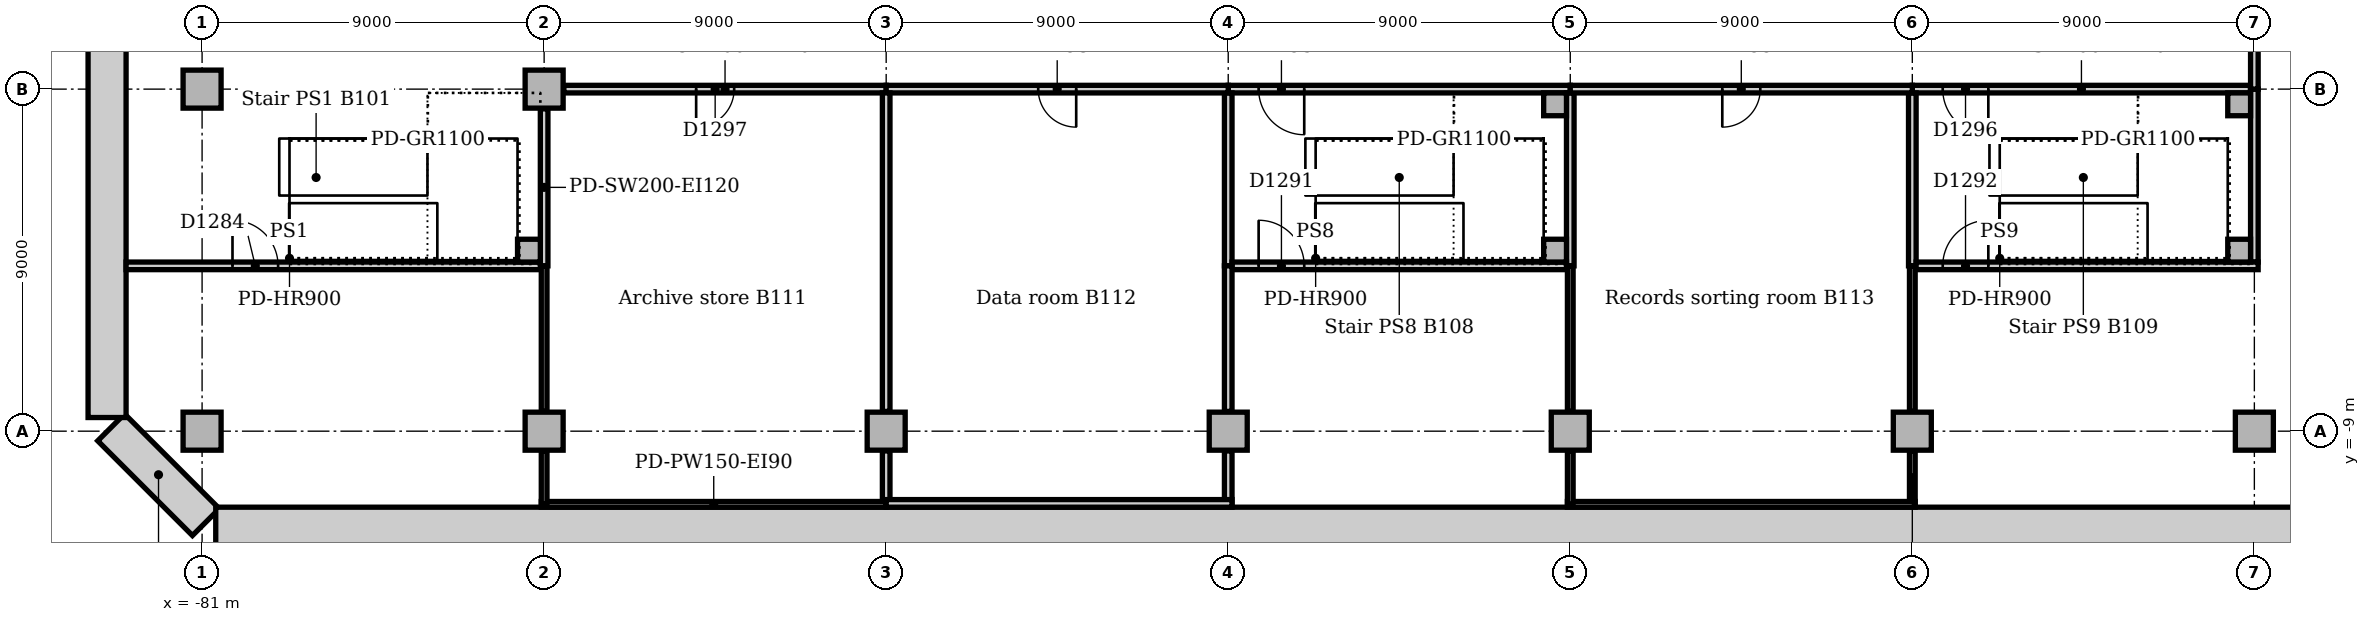
"""IFC4 building model, lengths in metres.
Left out: names, types, materials, properties, quantities, classifications, styles, units other than length and angle.
Written with IfcOpenShell. Run it as: python <this file> out.ifc"""

import sys

from ifc_helpers import new_model, si_unit, direction, frame, frame_2d, origin, origin_2d, place, context, subcontext, project, spatial, rectangle, extrude, element, fill, save


model = new_model("IFC4")
c1 = context("Model", 3, precision=1e-05, world=origin(), true_north=direction((0.0, 1.0)))
c2 = subcontext(c1, "Body", "Model", "MODEL_VIEW")
j1 = project(units=[si_unit("LENGTHUNIT", "METRE"), si_unit("PLANEANGLEUNIT", "RADIAN")], contexts=[c1])
p1 = place(None, origin())
s1 = spatial("IfcSite", under=j1, at=p1, CompositionType="ELEMENT")
p2 = place(p1, origin())
s2 = spatial("IfcBuilding", under=s1, at=p2, CompositionType="ELEMENT")
p3 = place(p2, frame((0.0, 0.0, -5.0)))
s3 = spatial("IfcBuildingStorey", under=s2, at=p3, CompositionType="ELEMENT", Elevation=-5.0)
p4 = place(p3, frame((-80.9, -11.392, 0.0), z_axis=(0.0, 0.0, 1.0), x_axis=(-0.707106781187, 0.707106781187, 0.0)))
e1 = element("IfcWall", 1, at=p4, inside=s3, PredefinedType="SOLIDWALL", context=c2, shape_type="SweptSolid", body=[
    extrude(rectangle(XDim=3.524, YDim=1.0, at=frame_2d((1.762, 0.0))), origin(), (0.0, 0.0, 1.0), 4.7),
])
p5 = place(p3, frame((-83.5, -8.641, 0.0), z_axis=(0.0, 0.0, 1.0), x_axis=(0.0, 1.0, 0.0)))
e2 = element("IfcWall", 2, at=p5, inside=s3, PredefinedType="SOLIDWALL", context=c2, shape_type="SweptSolid", body=[
    extrude(rectangle(XDim=62.282, YDim=1.0, at=frame_2d((31.141, 0.0))), origin(), (0.0, 0.0, 1.0), 4.7),
])
p6 = place(p3, frame((62.641, -11.5, 0.0), z_axis=(0.0, 0.0, 1.0), x_axis=(-1.0, 0.0, 0.0)))
e3 = element("IfcWall", 3, at=p6, inside=s3, PredefinedType="SOLIDWALL", context=c2, shape_type="SweptSolid", body=[
    extrude(rectangle(XDim=143.282, YDim=1.0, at=frame_2d((71.641, 0.0))), origin(), (0.0, 0.0, 1.0), 4.7),
])
for number, where, z_axis, x_axis in (
    (4, (-81.0, -9.0, 0.0), (0.0, 0.0, 1.0), (1.0, 0.0, 0.0)),
    (5, (-81.0, 0.0, 0.0), (0.0, 0.0, 1.0), (1.0, 0.0, 0.0)),
    (6, (-72.0, -9.0, 0.0), (0.0, 0.0, 1.0), (1.0, 0.0, 0.0)),
    (7, (-72.0, 0.0, 0.0), (0.0, 0.0, 1.0), (1.0, 0.0, 0.0)),
    (8, (-63.0, -9.0, 0.0), (0.0, 0.0, 1.0), (1.0, 0.0, 0.0)),
    (9, (-54.0, -9.0, 0.0), (0.0, 0.0, 1.0), (1.0, 0.0, 0.0)),
    (10, (-45.0, -9.0, 0.0), (0.0, 0.0, 1.0), (1.0, 0.0, 0.0)),
    (11, (-36.0, -9.0, 0.0), (0.0, 0.0, 1.0), (1.0, 0.0, 0.0)),
    (12, (-27.0, -9.0, 0.0), (0.0, 0.0, 1.0), (1.0, 0.0, 0.0)),
):
    element("IfcColumn", number, at=place(p3, frame(where, z_axis=z_axis, x_axis=x_axis)), inside=s3, PredefinedType="COLUMN", context=c2, shape_type="SweptSolid", body=[
        extrude(rectangle(XDim=1.0, YDim=1.0, at=origin_2d()), origin(), (0.0, 0.0, 1.0), 4.7),
    ])
for number, where, z_axis, x_axis in (
    (13, (-72.4, -4.25, 0.0), (0.0, 0.0, 1.0), (1.0, 0.0, 0.0)),
    (14, (-45.4, -4.25, 0.0), (0.0, 0.0, 1.0), (1.0, 0.0, 0.0)),
    (15, (-45.4, -0.4, 0.0), (0.0, 0.0, 1.0), (1.0, 0.0, 0.0)),
    (16, (-27.4, -4.25, 0.0), (0.0, 0.0, 1.0), (1.0, 0.0, 0.0)),
    (17, (-27.4, -0.4, 0.0), (0.0, 0.0, 1.0), (1.0, 0.0, 0.0)),
):
    element("IfcColumn", number, at=place(p3, frame(where, z_axis=z_axis, x_axis=x_axis)), inside=s3, PredefinedType="COLUMN", context=c2, shape_type="SweptSolid", body=[
        extrude(rectangle(XDim=0.6, YDim=0.6, at=origin_2d()), origin(), (0.0, 0.0, 1.0), 5.0),
    ])
p7 = place(p3, frame((-72.0, -4.65, 0.0), z_axis=(0.0, 0.0, 1.0), x_axis=(0.0, 1.0, 0.0)))
e18 = element("IfcWall", 18, at=p7, inside=s3, PredefinedType="SOLIDWALL", context=c2, shape_type="SweptSolid", body=[
    extrude(rectangle(XDim=4.13, YDim=0.2, at=frame_2d((2.065, 0.0))), origin(), (0.0, 0.0, 1.0), 4.7),
])
p8 = place(p3, frame((-83.0, -4.65, 0.0), z_axis=(0.0, 0.0, 1.0), x_axis=(1.0, 0.0, 0.0)))
e19 = element("IfcWall", 19, at=p8, inside=s3, PredefinedType="SOLIDWALL", context=c2, shape_type="SweptSolid", body=[
    extrude(rectangle(XDim=10.9, YDim=0.2, at=frame_2d((5.45, 0.0))), origin(), (0.0, 0.0, 1.0), 4.7),
])
p9 = place(p8, frame((2.8, 0.0, 0.0)))
e20 = element("IfcOpeningElement", 20, at=p9, cuts=e19, PredefinedType="OPENING", context=c2, shape_type="SweptSolid", body=[
    extrude(rectangle(XDim=1.2, YDim=2.1, at=frame_2d((0.6, 1.05))), frame((0.0, 0.11, 0.0), z_axis=(0.0, -1.0, 0.0), x_axis=(1.0, 0.0, 0.0)), (0.0, 0.0, 1.0), 0.22),
])
p10 = place(p3, frame((-54.0, 0.0, 0.0), z_axis=(0.0, 0.0, 1.0), x_axis=(1.0, 0.0, 0.0)))
e21 = element("IfcWall", 21, at=p10, inside=s3, PredefinedType="SOLIDWALL", context=c2, shape_type="SweptSolid", body=[
    extrude(rectangle(XDim=9.0, YDim=0.2, at=frame_2d((4.5, 0.0))), origin(), (0.0, 0.0, 1.0), 4.7),
])
p11 = place(p10, frame((0.8, 0.0, 0.0)))
e22 = element("IfcOpeningElement", 22, at=p11, cuts=e21, PredefinedType="OPENING", context=c2, shape_type="SweptSolid", body=[
    extrude(rectangle(XDim=1.2, YDim=2.1, at=frame_2d((0.6, 1.05))), frame((0.0, 0.11, 0.0), z_axis=(0.0, -1.0, 0.0), x_axis=(1.0, 0.0, 0.0)), (0.0, 0.0, 1.0), 0.22),
])
for number, where, z_axis, x_axis in (
    (23, (-54.0, -4.65, 0.0), (0.0, 0.0, 1.0), (0.0, 1.0, 0.0)),
    (24, (-45.0, -4.65, 0.0), (0.0, 0.0, 1.0), (0.0, 1.0, 0.0)),
):
    element("IfcWall", number, at=place(p3, frame(where, z_axis=z_axis, x_axis=x_axis)), inside=s3, PredefinedType="SOLIDWALL", context=c2, shape_type="SweptSolid", body=[
        extrude(rectangle(XDim=4.55, YDim=0.2, at=frame_2d((2.275, 0.0))), origin(), (0.0, 0.0, 1.0), 4.7),
    ])
p12 = place(p3, frame((-53.9, -4.65, 0.0), z_axis=(0.0, 0.0, 1.0), x_axis=(1.0, 0.0, 0.0)))
e25 = element("IfcWall", 25, at=p12, inside=s3, PredefinedType="SOLIDWALL", context=c2, shape_type="SweptSolid", body=[
    extrude(rectangle(XDim=8.8, YDim=0.2, at=frame_2d((4.4, 0.0))), origin(), (0.0, 0.0, 1.0), 4.7),
])
p13 = place(p12, frame((0.7, 0.0, 0.0)))
e26 = element("IfcOpeningElement", 26, at=p13, cuts=e25, PredefinedType="OPENING", context=c2, shape_type="SweptSolid", body=[
    extrude(rectangle(XDim=1.2, YDim=2.1, at=frame_2d((0.6, 1.05))), frame((0.0, 0.11, 0.0), z_axis=(0.0, -1.0, 0.0), x_axis=(1.0, 0.0, 0.0)), (0.0, 0.0, 1.0), 0.22),
])
p14 = place(p3, frame((-36.0, 0.0, 0.0), z_axis=(0.0, 0.0, 1.0), x_axis=(1.0, 0.0, 0.0)))
e27 = element("IfcWall", 27, at=p14, inside=s3, PredefinedType="SOLIDWALL", context=c2, shape_type="SweptSolid", body=[
    extrude(rectangle(XDim=8.9, YDim=0.2, at=frame_2d((4.45, 0.0))), origin(), (0.0, 0.0, 1.0), 4.7),
])
p15 = place(p14, frame((0.8, 0.0, 0.0)))
e28 = element("IfcOpeningElement", 28, at=p15, cuts=e27, PredefinedType="OPENING", context=c2, shape_type="SweptSolid", body=[
    extrude(rectangle(XDim=1.2, YDim=2.1, at=frame_2d((0.6, 1.05))), frame((0.0, 0.11, 0.0), z_axis=(0.0, -1.0, 0.0), x_axis=(1.0, 0.0, 0.0)), (0.0, 0.0, 1.0), 0.22),
])
for number, where, z_axis, x_axis in (
    (29, (-36.0, -4.65, 0.0), (0.0, 0.0, 1.0), (0.0, 1.0, 0.0)),
    (30, (-27.0, -4.55, 0.0), (0.0, 0.0, 1.0), (0.0, 1.0, 0.0)),
):
    element("IfcWall", number, at=place(p3, frame(where, z_axis=z_axis, x_axis=x_axis)), inside=s3, PredefinedType="SOLIDWALL", context=c2, shape_type="SweptSolid", body=[
        extrude(rectangle(XDim=4.55, YDim=0.2, at=frame_2d((2.275, 0.0))), origin(), (0.0, 0.0, 1.0), 4.7),
    ])
p16 = place(p3, frame((-35.9, -4.65, 0.0), z_axis=(0.0, 0.0, 1.0), x_axis=(1.0, 0.0, 0.0)))
e31 = element("IfcWall", 31, at=p16, inside=s3, PredefinedType="SOLIDWALL", context=c2, shape_type="SweptSolid", body=[
    extrude(rectangle(XDim=9.0, YDim=0.2, at=frame_2d((4.5, 0.0))), origin(), (0.0, 0.0, 1.0), 4.7),
])
p17 = place(p16, frame((0.7, 0.0, 0.0)))
e32 = element("IfcOpeningElement", 32, at=p17, cuts=e31, PredefinedType="OPENING", context=c2, shape_type="SweptSolid", body=[
    extrude(rectangle(XDim=1.2, YDim=2.1, at=frame_2d((0.6, 1.05))), frame((0.0, 0.11, 0.0), z_axis=(0.0, -1.0, 0.0), x_axis=(1.0, 0.0, 0.0)), (0.0, 0.0, 1.0), 0.22),
])
p18 = place(p3, frame((-71.48, 0.0, 0.0), z_axis=(0.0, 0.0, 1.0), x_axis=(1.0, 0.0, 0.0)))
e33 = element("IfcWall", 33, at=p18, inside=s3, PredefinedType="PARTITIONING", context=c2, shape_type="SweptSolid", body=[
    extrude(rectangle(XDim=8.48, YDim=0.2, at=frame_2d((4.24, 0.0))), origin(), (0.0, 0.0, 1.0), 4.7),
])
p19 = place(p18, frame((3.48, 0.0, 0.0)))
e34 = element("IfcOpeningElement", 34, at=p19, cuts=e33, PredefinedType="OPENING", context=c2, shape_type="SweptSolid", body=[
    extrude(rectangle(XDim=1.0, YDim=2.1, at=frame_2d((0.5, 1.05))), frame((0.0, 0.11, 0.0), z_axis=(0.0, -1.0, 0.0), x_axis=(1.0, 0.0, 0.0)), (0.0, 0.0, 1.0), 0.22),
])
p20 = place(p3, frame((-63.0, 0.0, 0.0), z_axis=(0.0, 0.0, 1.0), x_axis=(1.0, 0.0, 0.0)))
e35 = element("IfcWall", 35, at=p20, inside=s3, PredefinedType="PARTITIONING", context=c2, shape_type="SweptSolid", body=[
    extrude(rectangle(XDim=9.0, YDim=0.2, at=frame_2d((4.5, 0.0))), origin(), (0.0, 0.0, 1.0), 4.7),
])
p21 = place(p20, frame((4.0, 0.0, 0.0)))
e36 = element("IfcOpeningElement", 36, at=p21, cuts=e35, PredefinedType="OPENING", context=c2, shape_type="SweptSolid", body=[
    extrude(rectangle(XDim=1.0, YDim=2.1, at=frame_2d((0.5, 1.05))), frame((0.0, 0.11, 0.0), z_axis=(0.0, -1.0, 0.0), x_axis=(1.0, 0.0, 0.0)), (0.0, 0.0, 1.0), 0.22),
])
p22 = place(p3, frame((-45.0, 0.0, 0.0), z_axis=(0.0, 0.0, 1.0), x_axis=(1.0, 0.0, 0.0)))
e37 = element("IfcWall", 37, at=p22, inside=s3, PredefinedType="PARTITIONING", context=c2, shape_type="SweptSolid", body=[
    extrude(rectangle(XDim=9.0, YDim=0.2, at=frame_2d((4.5, 0.0))), origin(), (0.0, 0.0, 1.0), 4.7),
])
p23 = place(p22, frame((4.0, 0.0, 0.0)))
e38 = element("IfcOpeningElement", 38, at=p23, cuts=e37, PredefinedType="OPENING", context=c2, shape_type="SweptSolid", body=[
    extrude(rectangle(XDim=1.0, YDim=2.1, at=frame_2d((0.5, 1.05))), frame((0.0, 0.11, 0.0), z_axis=(0.0, -1.0, 0.0), x_axis=(1.0, 0.0, 0.0)), (0.0, 0.0, 1.0), 0.22),
])
p24 = place(p3, frame((-27.0, 0.0, 0.0), z_axis=(0.0, 0.0, 1.0), x_axis=(0.0, 1.0, 0.0)))
e39 = element("IfcWall", 39, at=p24, inside=s3, PredefinedType="PARTITIONING", context=c2, shape_type="SweptSolid", body=[
    extrude(rectangle(XDim=3.5, YDim=0.2, at=frame_2d((1.75, 0.0))), origin(), (0.0, 0.0, 1.0), 4.7),
])
p25 = place(p3, frame((-63.0, -10.9, 0.0), z_axis=(0.0, 0.0, 1.0), x_axis=(0.0, 1.0, 0.0)))
e40 = element("IfcWall", 40, at=p25, inside=s3, PredefinedType="PARTITIONING", context=c2, shape_type="SweptSolid", body=[
    extrude(rectangle(XDim=1.38, YDim=0.2, at=frame_2d((0.69, 0.0))), origin(), (0.0, 0.0, 1.0), 4.7),
])
p26 = place(p3, frame((-63.0, -8.48, 0.0), z_axis=(0.0, 0.0, 1.0), x_axis=(0.0, 1.0, 0.0)))
e41 = element("IfcWall", 41, at=p26, inside=s3, PredefinedType="PARTITIONING", context=c2, shape_type="SweptSolid", body=[
    extrude(rectangle(XDim=8.38, YDim=0.2, at=frame_2d((4.19, 0.0))), origin(), (0.0, 0.0, 1.0), 4.7),
])
p27 = place(p3, frame((-72.075, -10.925, 0.0), z_axis=(0.0, 0.0, 1.0), x_axis=(1.0, 0.0, 0.0)))
e42 = element("IfcWall", 42, at=p27, inside=s3, PredefinedType="PARTITIONING", context=c2, shape_type="SweptSolid", body=[
    extrude(rectangle(XDim=9.075, YDim=0.15, at=frame_2d((4.537, 0.0))), origin(), (0.0, 0.0, 1.0), 4.7),
])
p28 = place(p3, frame((-72.0, -10.925, 0.0), z_axis=(0.0, 0.0, 1.0), x_axis=(0.0, 1.0, 0.0)))
e43 = element("IfcWall", 43, at=p28, inside=s3, PredefinedType="PARTITIONING", context=c2, shape_type="SweptSolid", body=[
    extrude(rectangle(XDim=1.405, YDim=0.15, at=frame_2d((0.703, 0.0))), origin(), (0.0, 0.0, 1.0), 4.7),
])
p29 = place(p3, frame((-72.0, -8.48, 0.0), z_axis=(0.0, 0.0, 1.0), x_axis=(0.0, 1.0, 0.0)))
e44 = element("IfcWall", 44, at=p29, inside=s3, PredefinedType="PARTITIONING", context=c2, shape_type="SweptSolid", body=[
    extrude(rectangle(XDim=3.83, YDim=0.15, at=frame_2d((1.915, 0.0))), origin(), (0.0, 0.0, 1.0), 4.7),
])
p30 = place(p3, frame((-54.0, -10.9, 0.0), z_axis=(0.0, 0.0, 1.0), x_axis=(0.0, 1.0, 0.0)))
e45 = element("IfcWall", 45, at=p30, inside=s3, PredefinedType="PARTITIONING", context=c2, shape_type="SweptSolid", body=[
    extrude(rectangle(XDim=1.38, YDim=0.2, at=frame_2d((0.69, 0.0))), origin(), (0.0, 0.0, 1.0), 4.7),
])
p31 = place(p3, frame((-54.0, -8.48, 0.0), z_axis=(0.0, 0.0, 1.0), x_axis=(0.0, 1.0, 0.0)))
e46 = element("IfcWall", 46, at=p31, inside=s3, PredefinedType="PARTITIONING", context=c2, shape_type="SweptSolid", body=[
    extrude(rectangle(XDim=3.83, YDim=0.2, at=frame_2d((1.915, 0.0))), origin(), (0.0, 0.0, 1.0), 4.7),
])
p32 = place(p3, frame((-63.0, -10.9, 0.0), z_axis=(0.0, 0.0, 1.0), x_axis=(1.0, 0.0, 0.0)))
e47 = element("IfcWall", 47, at=p32, inside=s3, PredefinedType="PARTITIONING", context=c2, shape_type="SweptSolid", body=[
    extrude(rectangle(XDim=9.1, YDim=0.2, at=frame_2d((4.55, 0.0))), origin(), (0.0, 0.0, 1.0), 4.7),
])
p33 = place(p3, frame((-36.0, -10.925, 0.0), z_axis=(0.0, 0.0, 1.0), x_axis=(0.0, 1.0, 0.0)))
e48 = element("IfcWall", 48, at=p33, inside=s3, PredefinedType="PARTITIONING", context=c2, shape_type="SweptSolid", body=[
    extrude(rectangle(XDim=1.405, YDim=0.15, at=frame_2d((0.703, 0.0))), origin(), (0.0, 0.0, 1.0), 4.7),
])
p34 = place(p3, frame((-36.0, -8.48, 0.0), z_axis=(0.0, 0.0, 1.0), x_axis=(0.0, 1.0, 0.0)))
e49 = element("IfcWall", 49, at=p34, inside=s3, PredefinedType="PARTITIONING", context=c2, shape_type="SweptSolid", body=[
    extrude(rectangle(XDim=3.83, YDim=0.15, at=frame_2d((1.915, 0.0))), origin(), (0.0, 0.0, 1.0), 4.7),
])
p35 = place(p3, frame((-45.075, -10.925, 0.0), z_axis=(0.0, 0.0, 1.0), x_axis=(1.0, 0.0, 0.0)))
e50 = element("IfcWall", 50, at=p35, inside=s3, PredefinedType="PARTITIONING", context=c2, shape_type="SweptSolid", body=[
    extrude(rectangle(XDim=9.15, YDim=0.15, at=frame_2d((4.575, 0.0))), origin(), (0.0, 0.0, 1.0), 4.7),
])
p36 = place(p3, frame((-45.0, -10.925, 0.0), z_axis=(0.0, 0.0, 1.0), x_axis=(0.0, 1.0, 0.0)))
e51 = element("IfcWall", 51, at=p36, inside=s3, PredefinedType="PARTITIONING", context=c2, shape_type="SweptSolid", body=[
    extrude(rectangle(XDim=1.405, YDim=0.15, at=frame_2d((0.703, 0.0))), origin(), (0.0, 0.0, 1.0), 4.7),
])
p37 = place(p3, frame((-45.0, -8.48, 0.0), z_axis=(0.0, 0.0, 1.0), x_axis=(0.0, 1.0, 0.0)))
e52 = element("IfcWall", 52, at=p37, inside=s3, PredefinedType="PARTITIONING", context=c2, shape_type="SweptSolid", body=[
    extrude(rectangle(XDim=3.83, YDim=0.15, at=frame_2d((1.915, 0.0))), origin(), (0.0, 0.0, 1.0), 4.7),
])
p38 = place(p9, origin())
e53 = element("IfcDoor", 53, at=p38, inside=s3, OperationType="SINGLE_SWING_LEFT", PredefinedType="DOOR", context=c2, shape_type="SweptSolid", body=[
    extrude(rectangle(XDim=1.2, YDim=2.1, at=frame_2d((0.6, 1.05))), frame((0.0, 0.025, 0.0), z_axis=(0.0, -1.0, 0.0), x_axis=(1.0, 0.0, 0.0)), (0.0, 0.0, 1.0), 0.05),
])
fill(e20, e53)
p39 = place(p13, origin())
e54 = element("IfcDoor", 54, at=p39, inside=s3, OperationType="SINGLE_SWING_LEFT", PredefinedType="DOOR", context=c2, shape_type="SweptSolid", body=[
    extrude(rectangle(XDim=1.2, YDim=2.1, at=frame_2d((0.6, 1.05))), frame((0.0, 0.025, 0.0), z_axis=(0.0, -1.0, 0.0), x_axis=(1.0, 0.0, 0.0)), (0.0, 0.0, 1.0), 0.05),
])
fill(e26, e54)
p40 = place(p17, origin())
e55 = element("IfcDoor", 55, at=p40, inside=s3, OperationType="SINGLE_SWING_RIGHT", PredefinedType="DOOR", context=c2, shape_type="SweptSolid", body=[
    extrude(rectangle(XDim=1.2, YDim=2.1, at=frame_2d((0.6, 1.05))), frame((0.0, 0.025, 0.0), z_axis=(0.0, -1.0, 0.0), x_axis=(1.0, 0.0, 0.0)), (0.0, 0.0, 1.0), 0.05),
])
fill(e32, e55)
p41 = place(p11, frame((1.2, 0.0, 0.0), z_axis=(0.0, 0.0, 1.0), x_axis=(-1.0, 0.0, 0.0)))
e56 = element("IfcDoor", 56, at=p41, inside=s3, OperationType="SINGLE_SWING_LEFT", PredefinedType="DOOR", context=c2, shape_type="SweptSolid", body=[
    extrude(rectangle(XDim=1.2, YDim=2.1, at=frame_2d((0.6, 1.05))), frame((0.0, 0.025, 0.0), z_axis=(0.0, -1.0, 0.0), x_axis=(1.0, 0.0, 0.0)), (0.0, 0.0, 1.0), 0.05),
])
fill(e22, e56)
p42 = place(p15, frame((1.2, 0.0, 0.0), z_axis=(0.0, 0.0, 1.0), x_axis=(-1.0, 0.0, 0.0)))
e57 = element("IfcDoor", 57, at=p42, inside=s3, OperationType="SINGLE_SWING_LEFT", PredefinedType="DOOR", context=c2, shape_type="SweptSolid", body=[
    extrude(rectangle(XDim=1.2, YDim=2.1, at=frame_2d((0.6, 1.05))), frame((0.0, 0.025, 0.0), z_axis=(0.0, -1.0, 0.0), x_axis=(1.0, 0.0, 0.0)), (0.0, 0.0, 1.0), 0.05),
])
fill(e28, e57)
p43 = place(p19, frame((1.0, 0.0, 0.0), z_axis=(0.0, 0.0, 1.0), x_axis=(-1.0, 0.0, 0.0)))
e58 = element("IfcDoor", 58, at=p43, inside=s3, OperationType="SINGLE_SWING_RIGHT", PredefinedType="DOOR", context=c2, shape_type="SweptSolid", body=[
    extrude(rectangle(XDim=1.0, YDim=2.1, at=frame_2d((0.5, 1.05))), frame((0.0, 0.025, 0.0), z_axis=(0.0, -1.0, 0.0), x_axis=(1.0, 0.0, 0.0)), (0.0, 0.0, 1.0), 0.05),
])
fill(e34, e58)
p44 = place(p21, frame((1.0, 0.0, 0.0), z_axis=(0.0, 0.0, 1.0), x_axis=(-1.0, 0.0, 0.0)))
e59 = element("IfcDoor", 59, at=p44, inside=s3, OperationType="SINGLE_SWING_LEFT", PredefinedType="DOOR", context=c2, shape_type="SweptSolid", body=[
    extrude(rectangle(XDim=1.0, YDim=2.1, at=frame_2d((0.5, 1.05))), frame((0.0, 0.025, 0.0), z_axis=(0.0, -1.0, 0.0), x_axis=(1.0, 0.0, 0.0)), (0.0, 0.0, 1.0), 0.05),
])
fill(e36, e59)
p45 = place(p23, frame((1.0, 0.0, 0.0), z_axis=(0.0, 0.0, 1.0), x_axis=(-1.0, 0.0, 0.0)))
e60 = element("IfcDoor", 60, at=p45, inside=s3, OperationType="SINGLE_SWING_RIGHT", PredefinedType="DOOR", context=c2, shape_type="SweptSolid", body=[
    extrude(rectangle(XDim=1.0, YDim=2.1, at=frame_2d((0.5, 1.05))), frame((0.0, 0.025, 0.0), z_axis=(0.0, -1.0, 0.0), x_axis=(1.0, 0.0, 0.0)), (0.0, 0.0, 1.0), 0.05),
])
fill(e38, e60)
save(model, sys.argv[1])
